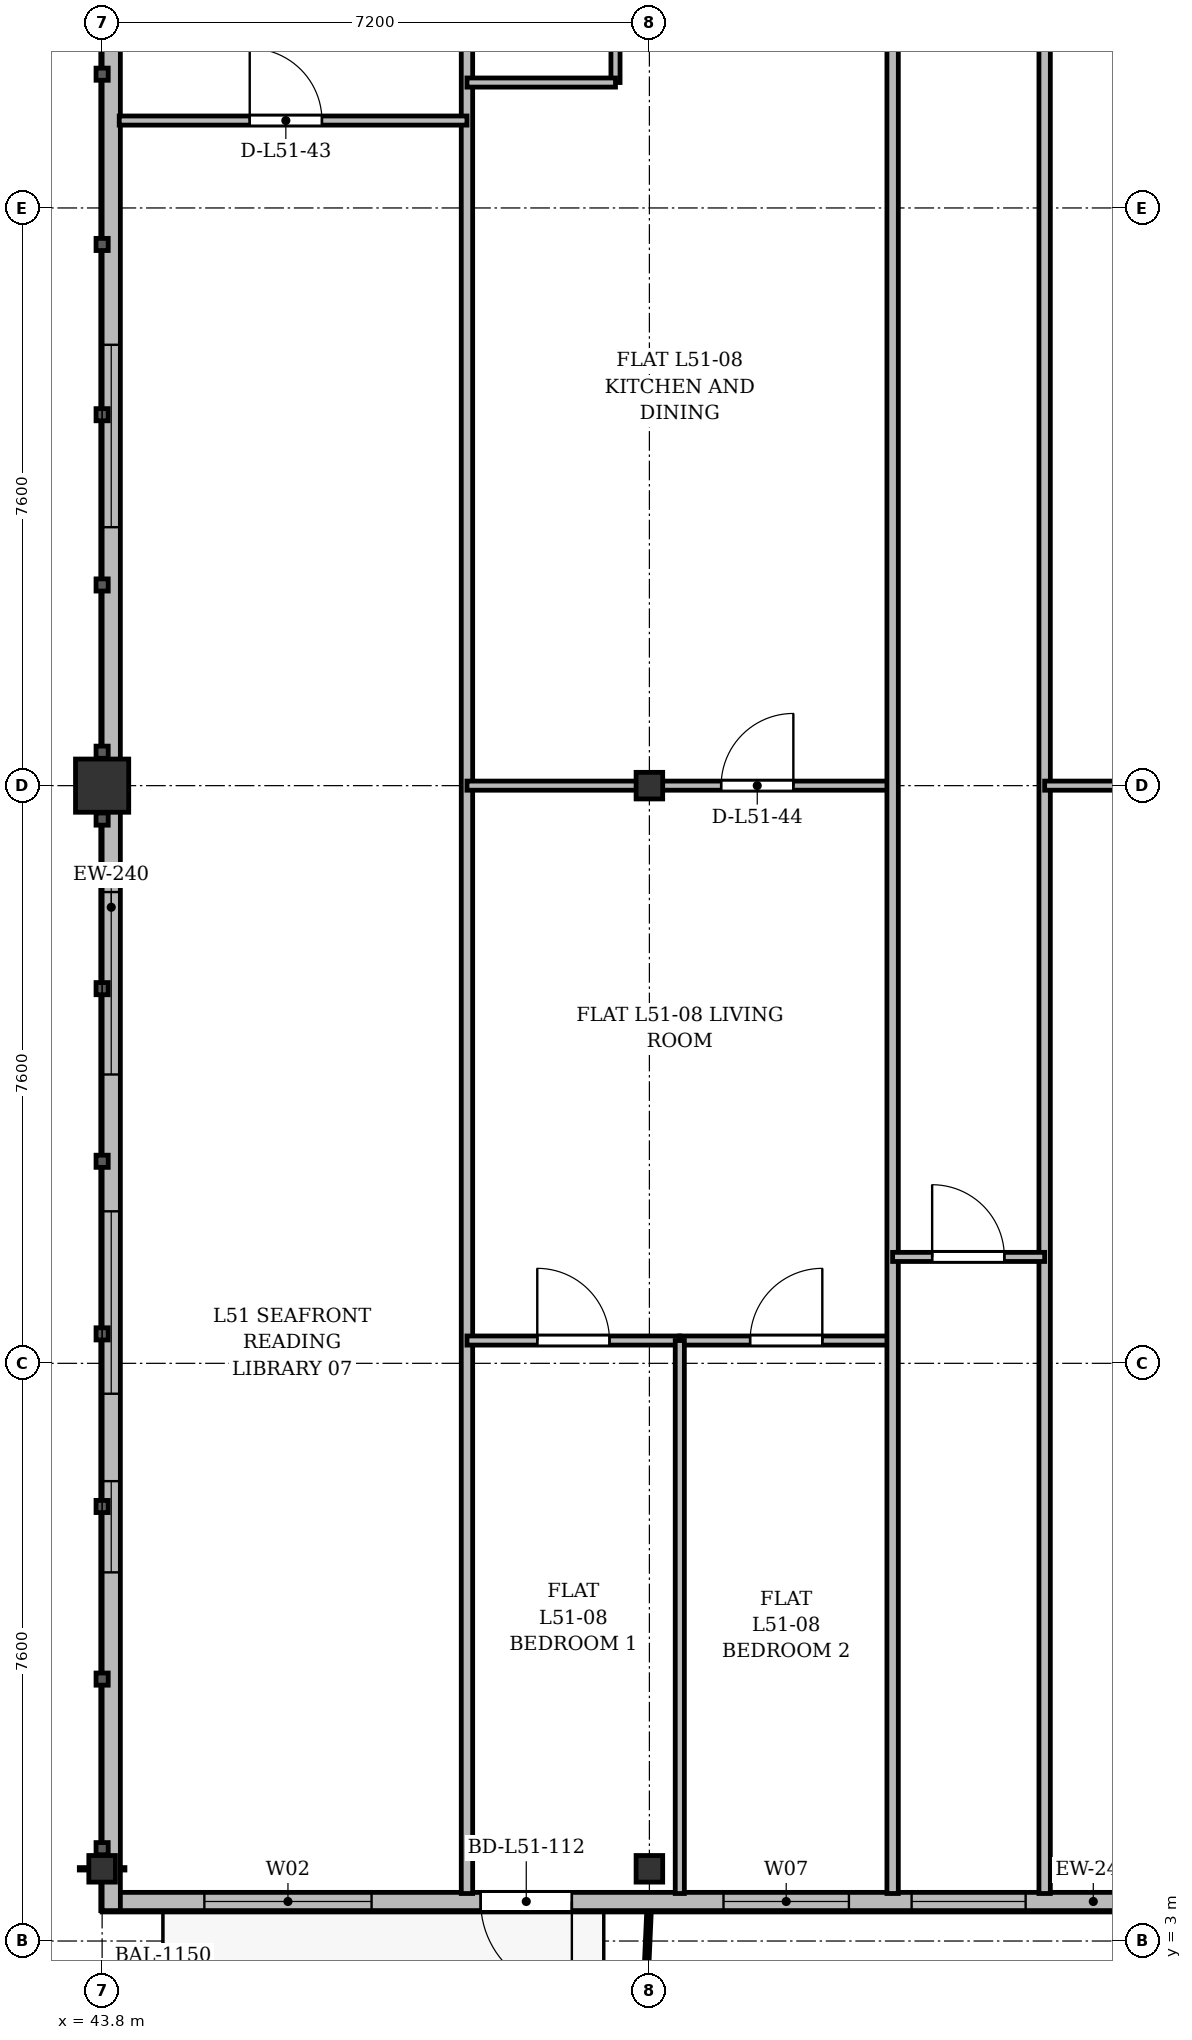
"""IFC4 building model, lengths in metres.
Left out: names, types, materials, properties, quantities, classifications, styles, units other than length and angle.
Written with IfcOpenShell. Run it as: python <this file> out.ifc"""

import sys

from ifc_helpers import new_model, si_unit, direction, frame, frame_2d, origin, origin_2d, place, context, subcontext, project, spatial, rectangle, i_section, extrude, source, transform, mapped, element, fill, save


model = new_model("IFC4")
c1 = context("Model", 3, precision=1e-05, world=origin(), true_north=direction((0.0, 1.0)))
c2 = subcontext(c1, "Body", "Model", "MODEL_VIEW")
j1 = project(units=[si_unit("LENGTHUNIT", "METRE"), si_unit("PLANEANGLEUNIT", "RADIAN")], contexts=[c1])
p1 = place(None, origin())
s1 = spatial("IfcSite", under=j1, at=p1, CompositionType="ELEMENT")
p2 = place(p1, origin())
s2 = spatial("IfcBuilding", under=s1, at=p2, CompositionType="ELEMENT")
p3 = place(p2, frame((0.0, 0.0, 197.7)))
s3 = spatial("IfcBuildingStorey", under=s2, at=p3, CompositionType="ELEMENT", Elevation=197.7)
m1 = source(origin(), c2, "Body", "SweptSolid", [
    extrude(i_section(OverallWidth=0.35, OverallDepth=0.35, WebThickness=0.018, FlangeThickness=0.028, at=origin_2d()), origin(), (0.0, 0.0, 1.0), 3.6),
])
p4 = place(p3, frame((43.8, 3.95, 0.0), z_axis=(0.0, 0.0, 1.0), x_axis=(1.0, 0.0, 0.0)))
e1 = element("IfcColumn", 1, at=p4, inside=s3, PredefinedType="COLUMN", context=c2, shape_type="MappedRepresentation", body=[
    mapped(m1, transform((0.0, 0.0, 0.0), x_axis=(1.0, 0.0, 0.0), y_axis=(0.0, 1.0, 0.0), z_axis=(0.0, 0.0, 1.0), scale=1.0)),
])
m2 = source(origin(), c2, "Body", "SweptSolid", [
    extrude(rectangle(XDim=0.7, YDim=0.7, at=origin_2d()), origin(), (0.0, 0.0, 1.0), 3.6),
])
p5 = place(p3, frame((43.8, 18.2, 0.0), z_axis=(0.0, 0.0, 1.0), x_axis=(1.0, 0.0, 0.0)))
e2 = element("IfcColumn", 2, at=p5, inside=s3, PredefinedType="COLUMN", context=c2, shape_type="MappedRepresentation", body=[
    mapped(m2, transform((0.0, 0.0, 0.0), x_axis=(1.0, 0.0, 0.0), y_axis=(0.0, 1.0, 0.0), z_axis=(0.0, 0.0, 1.0), scale=1.0)),
])
for number, where, z_axis, x_axis in (
    (3, (51.0, 3.95, 0.0), (0.0, 0.0, 1.0), (1.0, 0.0, 0.0)),
    (4, (51.0, 18.2, 0.0), (0.0, 0.0, 1.0), (1.0, 0.0, 0.0)),
):
    element("IfcColumn", number, at=place(p3, frame(where, z_axis=z_axis, x_axis=x_axis)), inside=s3, PredefinedType="COLUMN", context=c2, shape_type="MappedRepresentation", body=[
        mapped(m1, transform((0.0, 0.0, 0.0), x_axis=(1.0, 0.0, 0.0), y_axis=(0.0, 1.0, 0.0), z_axis=(0.0, 0.0, 1.0), scale=1.0)),
    ])
p6 = place(p3, frame((63.4, 3.52, 0.0), z_axis=(0.0, 0.0, 1.0), x_axis=(-1.0, 0.0, 0.0)))
e5 = element("IfcWall", 5, at=p6, inside=s3, PredefinedType="SOLIDWALL", context=c2, shape_type="SweptSolid", body=[
    extrude(rectangle(XDim=19.6, YDim=0.24, at=frame_2d((9.8, 0.0))), origin(), (0.0, 0.0, 1.0), 3.36),
])
p7 = place(p6, frame((0.395, 0.0, 0.9)))
e6 = element("IfcOpeningElement", 6, at=p7, cuts=e5, PredefinedType="OPENING", context=c2, shape_type="SweptSolid", body=[
    extrude(rectangle(XDim=0.9, YDim=1.65, at=frame_2d((0.45, 0.825))), frame((0.0, 0.13, 0.0), z_axis=(0.0, -1.0, 0.0), x_axis=(1.0, 0.0, 0.0)), (0.0, 0.0, 1.0), 0.26),
])
p8 = place(p6, frame((3.65, 0.0, 0.9)))
e7 = element("IfcOpeningElement", 7, at=p8, cuts=e5, PredefinedType="OPENING", context=c2, shape_type="SweptSolid", body=[
    extrude(rectangle(XDim=1.5, YDim=1.75, at=frame_2d((0.75, 0.875))), frame((0.0, 0.13, 0.0), z_axis=(0.0, -1.0, 0.0), x_axis=(1.0, 0.0, 0.0)), (0.0, 0.0, 1.0), 0.26),
])
p9 = place(p6, frame((7.45, 0.0, 0.9)))
e8 = element("IfcOpeningElement", 8, at=p9, cuts=e5, PredefinedType="OPENING", context=c2, shape_type="SweptSolid", body=[
    extrude(rectangle(XDim=1.5, YDim=1.75, at=frame_2d((0.75, 0.875))), frame((0.0, 0.13, 0.0), z_axis=(0.0, -1.0, 0.0), x_axis=(1.0, 0.0, 0.0)), (0.0, 0.0, 1.0), 0.26),
])
p10 = place(p6, frame((9.775, 0.0, 0.9)))
e9 = element("IfcOpeningElement", 9, at=p10, cuts=e5, PredefinedType="OPENING", context=c2, shape_type="SweptSolid", body=[
    extrude(rectangle(XDim=1.65, YDim=1.85, at=frame_2d((0.825, 0.925))), frame((0.0, 0.13, 0.0), z_axis=(0.0, -1.0, 0.0), x_axis=(1.0, 0.0, 0.0)), (0.0, 0.0, 1.0), 0.26),
])
p11 = place(p6, frame((13.42, 0.0, 0.0)))
e10 = element("IfcOpeningElement", 10, at=p11, cuts=e5, PredefinedType="OPENING", context=c2, shape_type="SweptSolid", body=[
    extrude(rectangle(XDim=1.2, YDim=2.2, at=frame_2d((0.6, 1.1))), frame((0.0, 0.13, 0.0), z_axis=(0.0, -1.0, 0.0), x_axis=(1.0, 0.0, 0.0)), (0.0, 0.0, 1.0), 0.26),
])
p12 = place(p6, frame((16.055, 0.0, 0.9)))
e11 = element("IfcOpeningElement", 11, at=p12, cuts=e5, PredefinedType="OPENING", context=c2, shape_type="SweptSolid", body=[
    extrude(rectangle(XDim=2.2, YDim=1.8, at=frame_2d((1.1, 0.9))), frame((0.0, 0.13, 0.0), z_axis=(0.0, -1.0, 0.0), x_axis=(1.0, 0.0, 0.0)), (0.0, 0.0, 1.0), 0.26),
])
p13 = place(p3, frame((43.92, 3.4, 0.0), z_axis=(0.0, 0.0, 1.0), x_axis=(0.0, 1.0, 0.0)))
e12 = element("IfcWall", 12, at=p13, inside=s3, PredefinedType="SOLIDWALL", context=c2, shape_type="SweptSolid", body=[
    extrude(rectangle(XDim=26.4, YDim=0.24, at=frame_2d((13.2, 0.0))), origin(), (0.0, 0.0, 1.0), 2.86),
])
p14 = place(p13, frame((4.45, 0.0, 0.92)))
e13 = element("IfcOpeningElement", 13, at=p14, cuts=e12, PredefinedType="OPENING", context=c2, shape_type="SweptSolid", body=[
    extrude(rectangle(XDim=1.2, YDim=1.65, at=frame_2d((0.6, 0.825))), frame((0.0, 0.13, 0.0), z_axis=(0.0, -1.0, 0.0), x_axis=(1.0, 0.0, 0.0)), (0.0, 0.0, 1.0), 0.26),
])
p15 = place(p13, frame((6.8, 0.0, 0.92)))
e14 = element("IfcOpeningElement", 14, at=p15, cuts=e12, PredefinedType="OPENING", context=c2, shape_type="SweptSolid", body=[
    extrude(rectangle(XDim=2.4, YDim=1.84, at=frame_2d((1.2, 0.92))), frame((0.0, 0.13, 0.0), z_axis=(0.0, -1.0, 0.0), x_axis=(1.0, 0.0, 0.0)), (0.0, 0.0, 1.0), 0.26),
])
p16 = place(p13, frame((11.0, 0.0, 0.92)))
e15 = element("IfcOpeningElement", 15, at=p16, cuts=e12, PredefinedType="OPENING", context=c2, shape_type="SweptSolid", body=[
    extrude(rectangle(XDim=2.4, YDim=1.84, at=frame_2d((1.2, 0.92))), frame((0.0, 0.13, 0.0), z_axis=(0.0, -1.0, 0.0), x_axis=(1.0, 0.0, 0.0)), (0.0, 0.0, 1.0), 0.26),
])
p17 = place(p13, frame((18.2, 0.0, 0.92)))
e16 = element("IfcOpeningElement", 16, at=p17, cuts=e12, PredefinedType="OPENING", context=c2, shape_type="SweptSolid", body=[
    extrude(rectangle(XDim=2.4, YDim=1.84, at=frame_2d((1.2, 0.92))), frame((0.0, 0.13, 0.0), z_axis=(0.0, -1.0, 0.0), x_axis=(1.0, 0.0, 0.0)), (0.0, 0.0, 1.0), 0.26),
])
p18 = place(p3, frame((48.6, 3.625, 0.0), z_axis=(0.0, 0.0, 1.0), x_axis=(0.0, 1.0, 0.0)))
e17 = element("IfcWall", 17, at=p18, inside=s3, PredefinedType="PARTITIONING", context=c2, shape_type="SweptSolid", body=[
    extrude(rectangle(XDim=27.175, YDim=0.15, at=frame_2d((13.587, 0.0))), origin(), (0.0, 0.0, 1.0), 2.91),
])
p19 = place(p3, frame((44.025, 26.95, 0.0), z_axis=(0.0, 0.0, 1.0), x_axis=(1.0, 0.0, 0.0)))
e18 = element("IfcWall", 18, at=p19, inside=s3, PredefinedType="PARTITIONING", context=c2, shape_type="SweptSolid", body=[
    extrude(rectangle(XDim=4.575, YDim=0.12, at=frame_2d((2.288, 0.0))), origin(), (0.0, 0.0, 1.0), 3.36),
])
p20 = place(p19, frame((1.717, 0.0, 0.0)))
e19 = element("IfcOpeningElement", 19, at=p20, cuts=e18, PredefinedType="OPENING", context=c2, shape_type="SweptSolid", body=[
    extrude(rectangle(XDim=0.95, YDim=2.15, at=frame_2d((0.475, 1.075))), frame((0.0, 0.07, 0.0), z_axis=(0.0, -1.0, 0.0), x_axis=(1.0, 0.0, 0.0)), (0.0, 0.0, 1.0), 0.14),
])
p21 = place(p3, frame((48.6, 18.2, 0.0), z_axis=(0.0, 0.0, 1.0), x_axis=(1.0, 0.0, 0.0)))
e20 = element("IfcWall", 20, at=p21, inside=s3, PredefinedType="PARTITIONING", context=c2, shape_type="SweptSolid", body=[
    extrude(rectangle(XDim=5.6, YDim=0.12, at=frame_2d((2.8, 0.0))), origin(), (0.0, 0.0, 1.0), 2.91),
])
p22 = place(p21, frame((3.344, 0.0, 0.0)))
e21 = element("IfcOpeningElement", 21, at=p22, cuts=e20, PredefinedType="OPENING", context=c2, shape_type="SweptSolid", body=[
    extrude(rectangle(XDim=0.95, YDim=2.15, at=frame_2d((0.475, 1.075))), frame((0.0, 0.07, 0.0), z_axis=(0.0, -1.0, 0.0), x_axis=(1.0, 0.0, 0.0)), (0.0, 0.0, 1.0), 0.14),
])
p23 = place(p3, frame((50.554, 27.45, 0.0), z_axis=(0.0, 0.0, 1.0), x_axis=(0.0, 1.0, 0.0)))
e22 = element("IfcWall", 22, at=p23, inside=s3, PredefinedType="PARTITIONING", context=c2, shape_type="SweptSolid", body=[
    extrude(rectangle(XDim=3.35, YDim=0.12, at=frame_2d((1.675, 0.0))), origin(), (0.0, 0.0, 1.0), 3.36),
])
p24 = place(p23, frame((0.8, 0.0, 0.0)))
e23 = element("IfcOpeningElement", 23, at=p24, cuts=e22, PredefinedType="OPENING", context=c2, shape_type="SweptSolid", body=[
    extrude(rectangle(XDim=0.85, YDim=2.1, at=frame_2d((0.425, 1.05))), frame((0.0, 0.07, 0.0), z_axis=(0.0, -1.0, 0.0), x_axis=(1.0, 0.0, 0.0)), (0.0, 0.0, 1.0), 0.14),
])
p25 = place(p3, frame((48.6, 27.45, 0.0), z_axis=(0.0, 0.0, 1.0), x_axis=(1.0, 0.0, 0.0)))
e24 = element("IfcWall", 24, at=p25, inside=s3, PredefinedType="PARTITIONING", context=c2, shape_type="SweptSolid", body=[
    extrude(rectangle(XDim=1.954, YDim=0.12, at=frame_2d((0.977, 0.0))), origin(), (0.0, 0.0, 1.0), 3.36),
])
p26 = place(p3, frame((48.6, 10.9, 0.0), z_axis=(0.0, 0.0, 1.0), x_axis=(1.0, 0.0, 0.0)))
e25 = element("IfcWall", 25, at=p26, inside=s3, PredefinedType="PARTITIONING", context=c2, shape_type="SweptSolid", body=[
    extrude(rectangle(XDim=2.8, YDim=0.12, at=frame_2d((1.4, 0.0))), origin(), (0.0, 0.0, 1.0), 2.86),
])
p27 = place(p26, frame((0.925, 0.0, 0.0)))
e26 = element("IfcOpeningElement", 26, at=p27, cuts=e25, PredefinedType="OPENING", context=c2, shape_type="SweptSolid", body=[
    extrude(rectangle(XDim=0.95, YDim=2.15, at=frame_2d((0.475, 1.075))), frame((0.0, 0.07, 0.0), z_axis=(0.0, -1.0, 0.0), x_axis=(1.0, 0.0, 0.0)), (0.0, 0.0, 1.0), 0.14),
])
p28 = place(p3, frame((51.4, 10.9, 0.0), z_axis=(0.0, 0.0, 1.0), x_axis=(1.0, 0.0, 0.0)))
e27 = element("IfcWall", 27, at=p28, inside=s3, PredefinedType="PARTITIONING", context=c2, shape_type="SweptSolid", body=[
    extrude(rectangle(XDim=2.8, YDim=0.12, at=frame_2d((1.4, 0.0))), origin(), (0.0, 0.0, 1.0), 3.06),
])
p29 = place(p28, frame((0.925, 0.0, 0.0)))
e28 = element("IfcOpeningElement", 28, at=p29, cuts=e27, PredefinedType="OPENING", context=c2, shape_type="SweptSolid", body=[
    extrude(rectangle(XDim=0.95, YDim=2.15, at=frame_2d((0.475, 1.075))), frame((0.0, 0.07, 0.0), z_axis=(0.0, -1.0, 0.0), x_axis=(1.0, 0.0, 0.0)), (0.0, 0.0, 1.0), 0.14),
])
p30 = place(p3, frame((51.4, 3.625, 0.0), z_axis=(0.0, 0.0, 1.0), x_axis=(0.0, 1.0, 0.0)))
e29 = element("IfcWall", 29, at=p30, inside=s3, PredefinedType="PARTITIONING", context=c2, shape_type="SweptSolid", body=[
    extrude(rectangle(XDim=7.275, YDim=0.12, at=frame_2d((3.637, 0.0))), origin(), (0.0, 0.0, 1.0), 2.91),
])
for number, where, z_axis, x_axis in (
    (30, (54.2, 3.625, 0.0), (0.0, 0.0, 1.0), (0.0, 1.0, 0.0)),
    (31, (56.2, 3.625, 0.0), (0.0, 0.0, 1.0), (0.0, 1.0, 0.0)),
):
    element("IfcWall", number, at=place(p3, frame(where, z_axis=z_axis, x_axis=x_axis)), inside=s3, PredefinedType="PARTITIONING", context=c2, shape_type="SweptSolid", body=[
        extrude(rectangle(XDim=27.175, YDim=0.15, at=frame_2d((13.587, 0.0))), origin(), (0.0, 0.0, 1.0), 2.91),
    ])
p31 = place(p3, frame((54.2, 12.0, 0.0), z_axis=(0.0, 0.0, 1.0), x_axis=(1.0, 0.0, 0.0)))
e32 = element("IfcWall", 32, at=p31, inside=s3, PredefinedType="PARTITIONING", context=c2, shape_type="SweptSolid", body=[
    extrude(rectangle(XDim=2.0, YDim=0.12, at=frame_2d((1.0, 0.0))), origin(), (0.0, 0.0, 1.0), 3.36),
])
p32 = place(p31, frame((0.52, 0.0, 0.0)))
e33 = element("IfcOpeningElement", 33, at=p32, cuts=e32, PredefinedType="OPENING", context=c2, shape_type="SweptSolid", body=[
    extrude(rectangle(XDim=0.95, YDim=2.15, at=frame_2d((0.475, 1.075))), frame((0.0, 0.07, 0.0), z_axis=(0.0, -1.0, 0.0), x_axis=(1.0, 0.0, 0.0)), (0.0, 0.0, 1.0), 0.14),
])
p33 = place(p3, frame((56.2, 18.2, 0.0), z_axis=(0.0, 0.0, 1.0), x_axis=(1.0, 0.0, 0.0)))
e34 = element("IfcWall", 34, at=p33, inside=s3, PredefinedType="PARTITIONING", context=c2, shape_type="SweptSolid", body=[
    extrude(rectangle(XDim=5.6, YDim=0.12, at=frame_2d((2.8, 0.0))), origin(), (0.0, 0.0, 1.0), 2.91),
])
p34 = place(p33, frame((3.714, 0.0, 0.0)))
e35 = element("IfcOpeningElement", 35, at=p34, cuts=e34, PredefinedType="OPENING", context=c2, shape_type="SweptSolid", body=[
    extrude(rectangle(XDim=0.95, YDim=2.15, at=frame_2d((0.475, 1.075))), frame((0.0, 0.07, 0.0), z_axis=(0.0, -1.0, 0.0), x_axis=(1.0, 0.0, 0.0)), (0.0, 0.0, 1.0), 0.14),
])
m3 = source(origin(), c2, "Body", "SweptSolid", [
    extrude(rectangle(XDim=1.5, YDim=1.75, at=frame_2d((0.75, 0.875))), frame((0.0, 0.03, 0.0), z_axis=(0.0, -1.0, 0.0), x_axis=(1.0, 0.0, 0.0)), (0.0, 0.0, 1.0), 0.06),
])
p35 = place(p9, origin())
e36 = element("IfcWindow", 36, at=p35, inside=s3, PartitioningType="SINGLE_PANEL", PredefinedType="WINDOW", context=c2, shape_type="MappedRepresentation", body=[
    mapped(m3, transform((0.0, 0.0, 0.0), x_axis=(1.0, 0.0, 0.0), y_axis=(0.0, 1.0, 0.0), z_axis=(0.0, 0.0, 1.0), scale=1.0)),
])
fill(e8, e36)
m4 = source(origin(), c2, "Body", "SweptSolid", [
    extrude(rectangle(XDim=1.65, YDim=1.85, at=frame_2d((0.825, 0.925))), frame((0.0, 0.03, 0.0), z_axis=(0.0, -1.0, 0.0), x_axis=(1.0, 0.0, 0.0)), (0.0, 0.0, 1.0), 0.06),
])
p36 = place(p10, origin())
e37 = element("IfcWindow", 37, at=p36, inside=s3, PartitioningType="SINGLE_PANEL", PredefinedType="WINDOW", context=c2, shape_type="MappedRepresentation", body=[
    mapped(m4, transform((0.0, 0.0, 0.0), x_axis=(1.0, 0.0, 0.0), y_axis=(0.0, 1.0, 0.0), z_axis=(0.0, 0.0, 1.0), scale=1.0)),
])
fill(e9, e37)
m5 = source(origin(), c2, "Body", "SweptSolid", [
    extrude(rectangle(XDim=1.2, YDim=2.2, at=frame_2d((0.6, 1.1))), frame((0.0, 0.025, 0.0), z_axis=(0.0, -1.0, 0.0), x_axis=(1.0, 0.0, 0.0)), (0.0, 0.0, 1.0), 0.05),
])
p37 = place(p11, origin())
e38 = element("IfcDoor", 38, at=p37, inside=s3, OperationType="SINGLE_SWING_LEFT", PredefinedType="DOOR", context=c2, shape_type="MappedRepresentation", body=[
    mapped(m5, transform((0.0, 0.0, 0.0), x_axis=(1.0, 0.0, 0.0), y_axis=(0.0, 1.0, 0.0), z_axis=(0.0, 0.0, 1.0), scale=1.0)),
])
fill(e10, e38)
m6 = source(origin(), c2, "Body", "SweptSolid", [
    extrude(rectangle(XDim=2.2, YDim=1.8, at=frame_2d((1.1, 0.9))), frame((0.0, 0.03, 0.0), z_axis=(0.0, -1.0, 0.0), x_axis=(1.0, 0.0, 0.0)), (0.0, 0.0, 1.0), 0.06),
])
p38 = place(p12, origin())
e39 = element("IfcWindow", 39, at=p38, inside=s3, PartitioningType="SINGLE_PANEL", PredefinedType="WINDOW", context=c2, shape_type="MappedRepresentation", body=[
    mapped(m6, transform((0.0, 0.0, 0.0), x_axis=(1.0, 0.0, 0.0), y_axis=(0.0, 1.0, 0.0), z_axis=(0.0, 0.0, 1.0), scale=1.0)),
])
fill(e11, e39)
m7 = source(origin(), c2, "Body", "SweptSolid", [
    extrude(rectangle(XDim=1.2, YDim=1.65, at=frame_2d((0.6, 0.825))), frame((0.0, 0.03, 0.0), z_axis=(0.0, -1.0, 0.0), x_axis=(1.0, 0.0, 0.0)), (0.0, 0.0, 1.0), 0.06),
])
p39 = place(p14, origin())
e40 = element("IfcWindow", 40, at=p39, inside=s3, PartitioningType="SINGLE_PANEL", PredefinedType="WINDOW", context=c2, shape_type="MappedRepresentation", body=[
    mapped(m7, transform((0.0, 0.0, 0.0), x_axis=(1.0, 0.0, 0.0), y_axis=(0.0, 1.0, 0.0), z_axis=(0.0, 0.0, 1.0), scale=1.0)),
])
fill(e13, e40)
m8 = source(origin(), c2, "Body", "SweptSolid", [
    extrude(rectangle(XDim=2.4, YDim=1.84, at=frame_2d((1.2, 0.92))), frame((0.0, 0.03, 0.0), z_axis=(0.0, -1.0, 0.0), x_axis=(1.0, 0.0, 0.0)), (0.0, 0.0, 1.0), 0.06),
])
p40 = place(p15, origin())
e41 = element("IfcWindow", 41, at=p40, inside=s3, PartitioningType="SINGLE_PANEL", PredefinedType="WINDOW", context=c2, shape_type="MappedRepresentation", body=[
    mapped(m8, transform((0.0, 0.0, 0.0), x_axis=(1.0, 0.0, 0.0), y_axis=(0.0, 1.0, 0.0), z_axis=(0.0, 0.0, 1.0), scale=1.0)),
])
fill(e14, e41)
p41 = place(p16, origin())
e42 = element("IfcWindow", 42, at=p41, inside=s3, PartitioningType="SINGLE_PANEL", PredefinedType="WINDOW", context=c2, shape_type="MappedRepresentation", body=[
    mapped(m8, transform((0.0, 0.0, 0.0), x_axis=(1.0, 0.0, 0.0), y_axis=(0.0, 1.0, 0.0), z_axis=(0.0, 0.0, 1.0), scale=1.0)),
])
fill(e15, e42)
p42 = place(p17, origin())
e43 = element("IfcWindow", 43, at=p42, inside=s3, PartitioningType="SINGLE_PANEL", PredefinedType="WINDOW", context=c2, shape_type="MappedRepresentation", body=[
    mapped(m8, transform((0.0, 0.0, 0.0), x_axis=(1.0, 0.0, 0.0), y_axis=(0.0, 1.0, 0.0), z_axis=(0.0, 0.0, 1.0), scale=1.0)),
])
fill(e16, e43)
m9 = source(origin(), c2, "Body", "SweptSolid", [
    extrude(rectangle(XDim=0.95, YDim=2.15, at=frame_2d((0.475, 1.075))), frame((0.0, 0.025, 0.0), z_axis=(0.0, -1.0, 0.0), x_axis=(1.0, 0.0, 0.0)), (0.0, 0.0, 1.0), 0.05),
])
p43 = place(p20, origin())
e44 = element("IfcDoor", 44, at=p43, inside=s3, OperationType="SINGLE_SWING_LEFT", PredefinedType="DOOR", context=c2, shape_type="MappedRepresentation", body=[
    mapped(m9, transform((0.0, 0.0, 0.0), x_axis=(1.0, 0.0, 0.0), y_axis=(0.0, 1.0, 0.0), z_axis=(0.0, 0.0, 1.0), scale=1.0)),
])
fill(e19, e44)
p44 = place(p22, origin())
e45 = element("IfcDoor", 45, at=p44, inside=s3, OperationType="SINGLE_SWING_RIGHT", PredefinedType="DOOR", context=c2, shape_type="MappedRepresentation", body=[
    mapped(m9, transform((0.0, 0.0, 0.0), x_axis=(1.0, 0.0, 0.0), y_axis=(0.0, 1.0, 0.0), z_axis=(0.0, 0.0, 1.0), scale=1.0)),
])
fill(e21, e45)
p45 = place(p27, origin())
e46 = element("IfcDoor", 46, at=p45, inside=s3, OperationType="SINGLE_SWING_LEFT", PredefinedType="DOOR", context=c2, shape_type="MappedRepresentation", body=[
    mapped(m9, transform((0.0, 0.0, 0.0), x_axis=(1.0, 0.0, 0.0), y_axis=(0.0, 1.0, 0.0), z_axis=(0.0, 0.0, 1.0), scale=1.0)),
])
fill(e26, e46)
p46 = place(p29, origin())
e47 = element("IfcDoor", 47, at=p46, inside=s3, OperationType="SINGLE_SWING_RIGHT", PredefinedType="DOOR", context=c2, shape_type="MappedRepresentation", body=[
    mapped(m9, transform((0.0, 0.0, 0.0), x_axis=(1.0, 0.0, 0.0), y_axis=(0.0, 1.0, 0.0), z_axis=(0.0, 0.0, 1.0), scale=1.0)),
])
fill(e28, e47)
p47 = place(p32, origin())
e48 = element("IfcDoor", 48, at=p47, inside=s3, OperationType="SINGLE_SWING_LEFT", PredefinedType="DOOR", context=c2, shape_type="MappedRepresentation", body=[
    mapped(m9, transform((0.0, 0.0, 0.0), x_axis=(1.0, 0.0, 0.0), y_axis=(0.0, 1.0, 0.0), z_axis=(0.0, 0.0, 1.0), scale=1.0)),
])
fill(e33, e48)
save(model, sys.argv[1])
